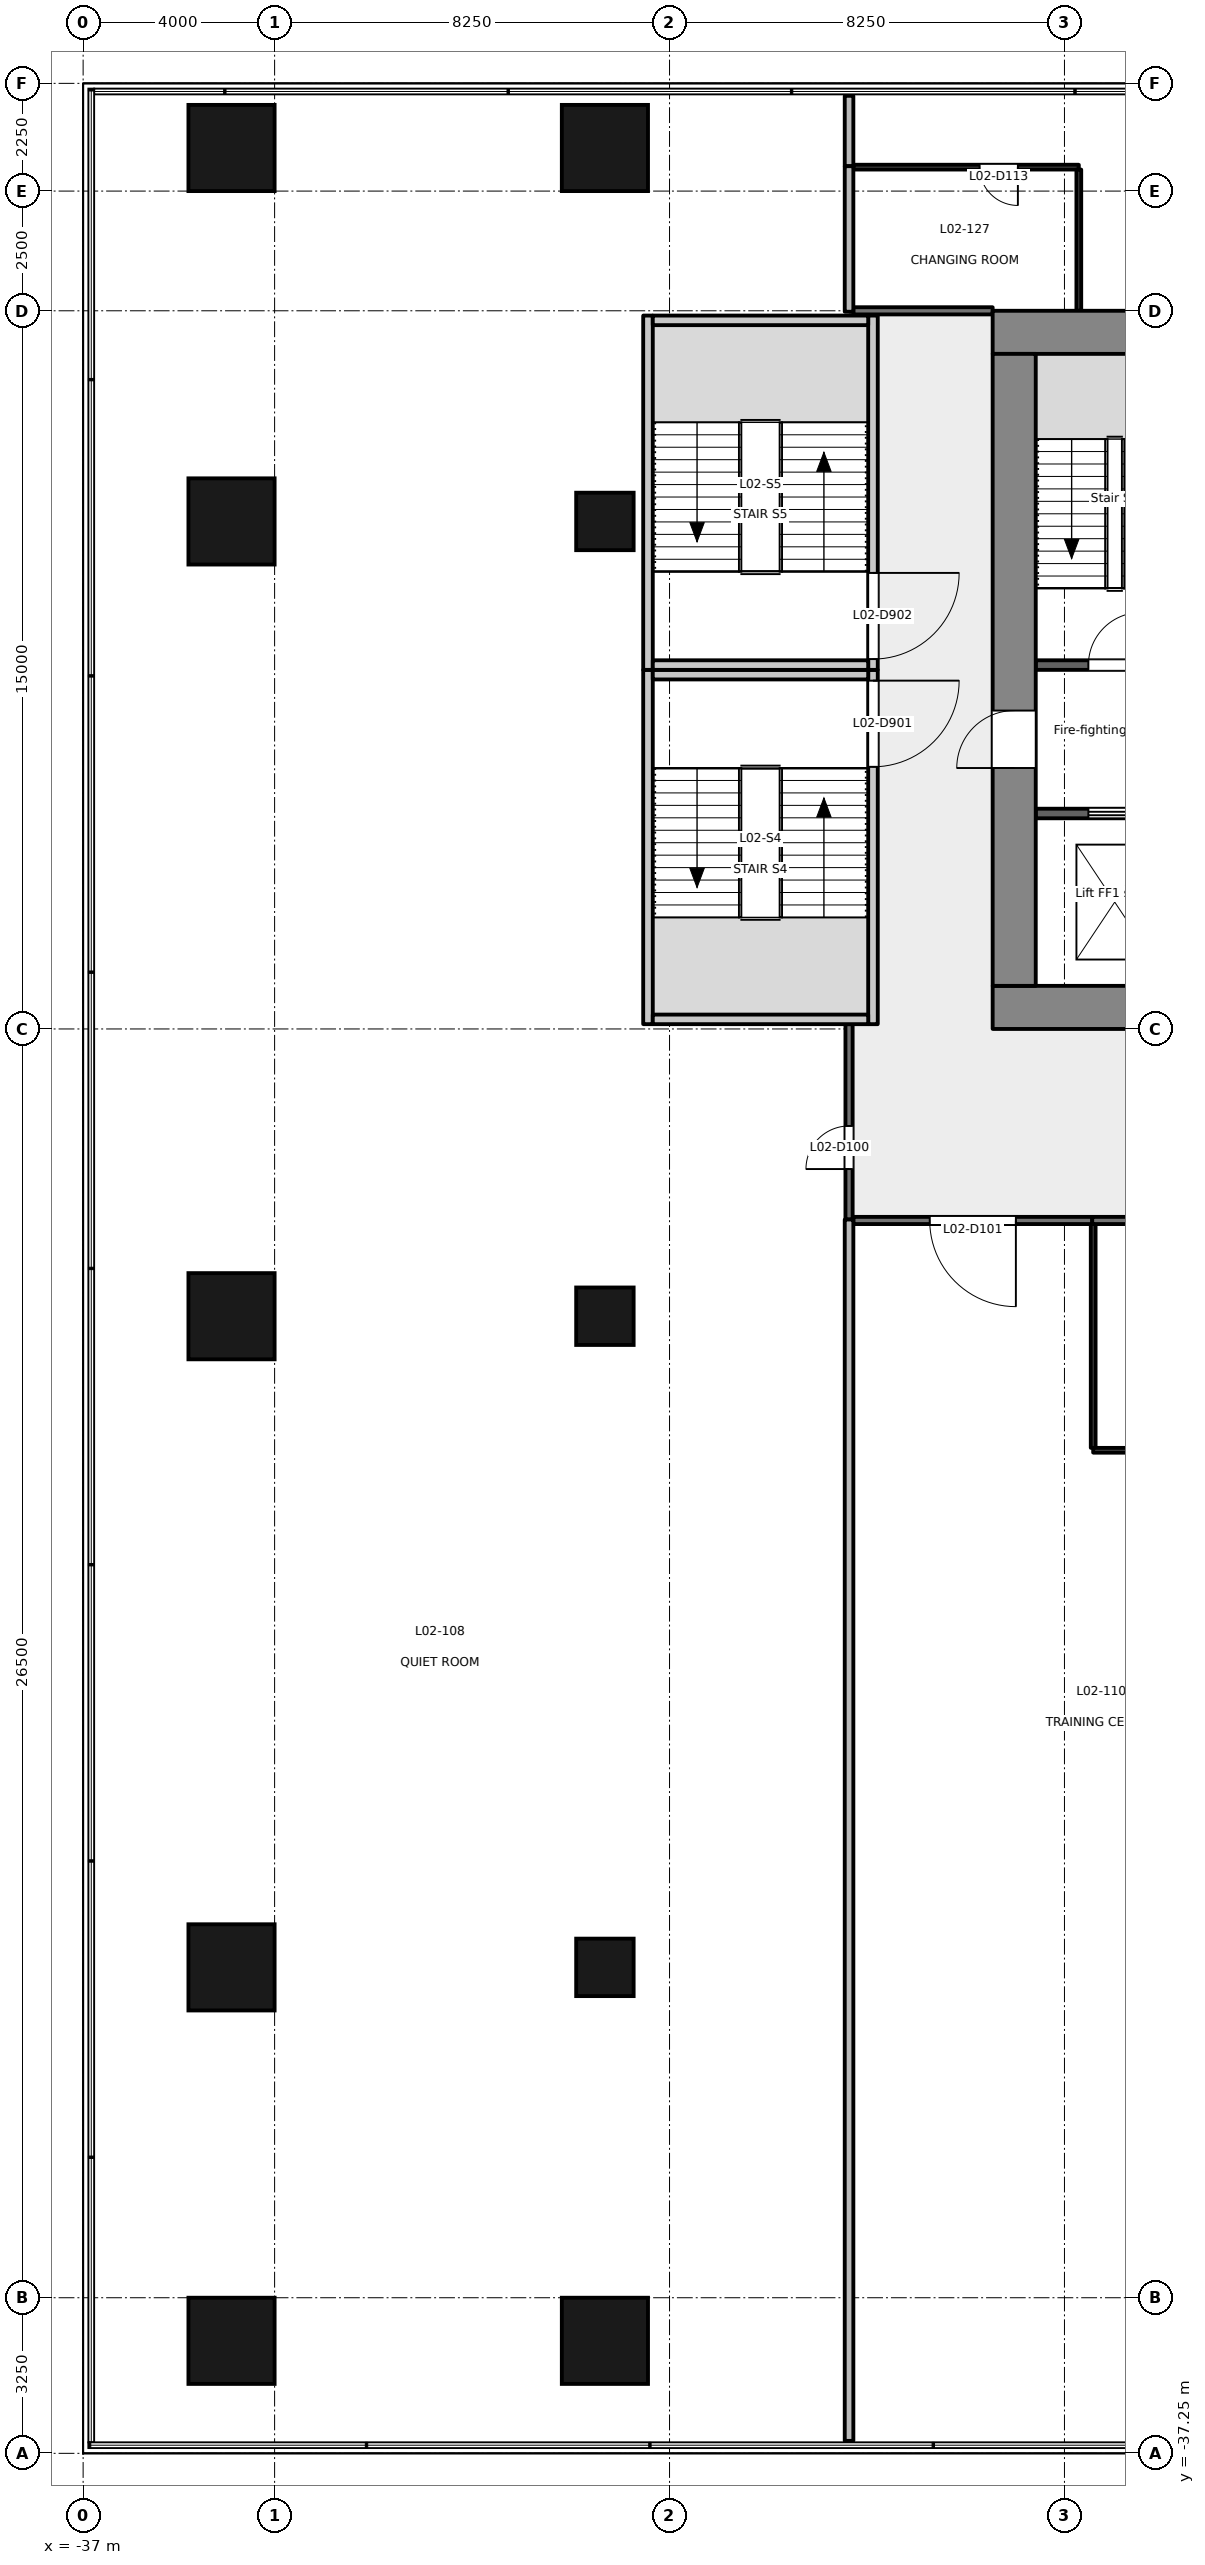
"""IFC4 building model, lengths in metres.
Left out: names, types, materials, properties, quantities, classifications, styles, units other than length and angle.
Written with IfcOpenShell. Run it as: python <this file> out.ifc"""

import sys

from ifc_helpers import new_model, si_unit, direction, frame, frame_2d, origin, origin_2d, place, context, subcontext, project, spatial, rectangle, extrude, element, fill, save


model = new_model("IFC4")
c1 = context("Model", 3, precision=1e-05, world=origin(), true_north=direction((0.0, 1.0)))
c2 = subcontext(c1, "Body", "Model", "MODEL_VIEW")
j1 = project(units=[si_unit("LENGTHUNIT", "METRE"), si_unit("PLANEANGLEUNIT", "RADIAN")], contexts=[c1])
p1 = place(None, origin())
s1 = spatial("IfcSite", under=j1, at=p1, CompositionType="ELEMENT")
p2 = place(p1, origin())
s2 = spatial("IfcBuilding", under=s1, at=p2, CompositionType="ELEMENT")
p3 = place(p2, frame((0.0, 0.0, 12.6)))
s3 = spatial("IfcBuildingStorey", under=s2, at=p3, CompositionType="ELEMENT", Elevation=12.6)
for number, where, z_axis, x_axis in (
    (1, (-33.9, -34.9, -0.2), (0.0, 0.0, 1.0), (1.0, 0.0, 0.0)),
    (2, (-33.9, 10.9, -0.2), (0.0, 0.0, 1.0), (1.0, 0.0, 0.0)),
    (3, (-26.1, -34.9, -0.2), (0.0, 0.0, 1.0), (1.0, 0.0, 0.0)),
    (4, (-33.9, -27.1, -0.2), (0.0, 0.0, 1.0), (0.0, 1.0, 0.0)),
    (5, (-33.9, -13.5, -0.2), (0.0, 0.0, 1.0), (0.0, 1.0, 0.0)),
    (6, (-33.9, 3.1, -0.2), (0.0, 0.0, 1.0), (0.0, 1.0, 0.0)),
    (7, (-26.1, 10.9, -0.2), (0.0, 0.0, 1.0), (1.0, 0.0, 0.0)),
):
    element("IfcColumn", number, at=place(p3, frame(where, z_axis=z_axis, x_axis=x_axis)), inside=s3, PredefinedType="COLUMN", context=c2, shape_type="SweptSolid", body=[
        extrude(rectangle(XDim=1.8, YDim=1.8, at=origin_2d()), origin(), (0.0, 0.0, 1.0), 4.8),
    ])
for number, where, z_axis, x_axis in (
    (8, (-26.1, -27.1, -0.2), (0.0, 0.0, 1.0), (1.0, 0.0, 0.0)),
    (9, (-26.1, -13.5, -0.2), (0.0, 0.0, 1.0), (1.0, 0.0, 0.0)),
    (10, (-26.1, 3.1, -0.2), (0.0, 0.0, 1.0), (1.0, 0.0, 0.0)),
):
    element("IfcColumn", number, at=place(p3, frame(where, z_axis=z_axis, x_axis=x_axis)), inside=s3, PredefinedType="COLUMN", context=c2, shape_type="SweptSolid", body=[
        extrude(rectangle(XDim=1.2, YDim=1.2, at=origin_2d()), origin(), (0.0, 0.0, 1.0), 4.8),
    ])
p4 = place(p3, frame((-18.0, -7.05, -0.2), z_axis=(0.0, 0.0, 1.0), x_axis=(1.0, 0.0, 0.0)))
e11 = element("IfcWall", 11, at=p4, inside=s3, PredefinedType="SHEAR", context=c2, shape_type="SweptSolid", body=[
    extrude(rectangle(XDim=36.0, YDim=0.9, at=frame_2d((18.0, 0.0))), origin(), (0.0, 0.0, 1.0), 4.8),
])
p5 = place(p4, frame((7.8, 0.0, 0.2)))
e12 = element("IfcOpeningElement", 12, at=p5, cuts=e11, PredefinedType="OPENING", context=c2, shape_type="SweptSolid", body=[
    extrude(rectangle(XDim=2.4, YDim=2.1, at=frame_2d((1.2, 1.05))), frame((0.0, 0.46, 0.0), z_axis=(0.0, -1.0, 0.0), x_axis=(1.0, 0.0, 0.0)), (0.0, 0.0, 1.0), 0.921),
])
p6 = place(p4, frame((17.4, 0.0, 0.2)))
e13 = element("IfcOpeningElement", 13, at=p6, cuts=e11, PredefinedType="OPENING", context=c2, shape_type="SweptSolid", body=[
    extrude(rectangle(XDim=1.2, YDim=2.1, at=frame_2d((0.6, 1.05))), frame((0.0, 0.46, 0.0), z_axis=(0.0, -1.0, 0.0), x_axis=(1.0, 0.0, 0.0)), (0.0, 0.0, 1.0), 0.921),
])
p7 = place(p4, frame((26.1, 0.0, 0.2)))
e14 = element("IfcOpeningElement", 14, at=p7, cuts=e11, PredefinedType="OPENING", context=c2, shape_type="SweptSolid", body=[
    extrude(rectangle(XDim=2.4, YDim=2.1, at=frame_2d((1.2, 1.05))), frame((0.0, 0.46, 0.0), z_axis=(0.0, -1.0, 0.0), x_axis=(1.0, 0.0, 0.0)), (0.0, 0.0, 1.0), 0.921),
])
p8 = place(p3, frame((-18.0, 7.05, -0.2), z_axis=(0.0, 0.0, 1.0), x_axis=(1.0, 0.0, 0.0)))
e15 = element("IfcWall", 15, at=p8, inside=s3, PredefinedType="SHEAR", context=c2, shape_type="SweptSolid", body=[
    extrude(rectangle(XDim=36.0, YDim=0.9, at=frame_2d((18.0, 0.0))), origin(), (0.0, 0.0, 1.0), 4.8),
])
p9 = place(p3, frame((-17.55, -6.6, -0.2), z_axis=(0.0, 0.0, 1.0), x_axis=(0.0, 1.0, 0.0)))
e16 = element("IfcWall", 16, at=p9, inside=s3, PredefinedType="SHEAR", context=c2, shape_type="SweptSolid", body=[
    extrude(rectangle(XDim=13.2, YDim=0.9, at=frame_2d((6.6, 0.0))), origin(), (0.0, 0.0, 1.0), 4.8),
])
p10 = place(p9, frame((4.55, 0.0, 0.2)))
e17 = element("IfcOpeningElement", 17, at=p10, cuts=e16, PredefinedType="OPENING", context=c2, shape_type="SweptSolid", body=[
    extrude(rectangle(XDim=1.2, YDim=2.1, at=frame_2d((0.6, 1.05))), frame((0.0, 0.46, 0.0), z_axis=(0.0, -1.0, 0.0), x_axis=(1.0, 0.0, 0.0)), (0.0, 0.0, 1.0), 0.921),
])
p11 = place(p3, frame((-17.1, -3.0, 0.0), z_axis=(0.0, 0.0, 1.0), x_axis=(1.0, 0.0, 0.0)))
e18 = element("IfcWall", 18, at=p11, inside=s3, PredefinedType="PARTITIONING", context=c2, shape_type="SweptSolid", body=[
    extrude(rectangle(XDim=3.3, YDim=0.2, at=frame_2d((1.65, 0.0))), origin(), (0.0, 0.0, 1.0), 4.6),
])
p12 = place(p11, frame((1.1, 0.0, 0.0)))
e19 = element("IfcOpeningElement", 19, at=p12, cuts=e18, PredefinedType="OPENING", context=c2, shape_type="SweptSolid", body=[
    extrude(rectangle(XDim=1.1, YDim=2.1, at=frame_2d((0.55, 1.05))), frame((0.0, 0.111, 0.0), z_axis=(0.0, -1.0, 0.0), x_axis=(1.0, 0.0, 0.0)), (0.0, 0.0, 1.0), 0.221),
])
p13 = place(p3, frame((-17.1, 0.1, 0.0), z_axis=(0.0, 0.0, 1.0), x_axis=(1.0, 0.0, 0.0)))
e20 = element("IfcWall", 20, at=p13, inside=s3, PredefinedType="PARTITIONING", context=c2, shape_type="SweptSolid", body=[
    extrude(rectangle(XDim=3.3, YDim=0.2, at=frame_2d((1.65, 0.0))), origin(), (0.0, 0.0, 1.0), 4.6),
])
p14 = place(p13, frame((1.1, 0.0, 0.0)))
e21 = element("IfcOpeningElement", 21, at=p14, cuts=e20, PredefinedType="OPENING", context=c2, shape_type="SweptSolid", body=[
    extrude(rectangle(XDim=1.1, YDim=2.1, at=frame_2d((0.55, 1.05))), frame((0.0, 0.111, 0.0), z_axis=(0.0, -1.0, 0.0), x_axis=(1.0, 0.0, 0.0)), (0.0, 0.0, 1.0), 0.221),
])
p15 = place(p3, frame((-20.5, 0.0, -0.2), z_axis=(0.0, 0.0, 1.0), x_axis=(0.0, -1.0, 0.0)))
e22 = element("IfcWall", 22, at=p15, inside=s3, PredefinedType="SHEAR", context=c2, shape_type="SweptSolid", body=[
    extrude(rectangle(XDim=7.4, YDim=0.2, at=frame_2d((3.7, 0.0))), origin(), (0.0, 0.0, 1.0), 4.8),
])
p16 = place(p15, frame((0.225, 0.0, 0.2)))
e23 = element("IfcOpeningElement", 23, at=p16, cuts=e22, PredefinedType="OPENING", context=c2, shape_type="SweptSolid", body=[
    extrude(rectangle(XDim=1.8, YDim=2.1, at=frame_2d((0.9, 1.05))), frame((0.0, 0.111, 0.0), z_axis=(0.0, -1.0, 0.0), x_axis=(1.0, 0.0, 0.0)), (0.0, 0.0, 1.0), 0.221),
])
p17 = place(p3, frame((-25.2, -7.4, -0.2), z_axis=(0.0, 0.0, 1.0), x_axis=(0.0, 1.0, 0.0)))
e24 = element("IfcWall", 24, at=p17, inside=s3, PredefinedType="SHEAR", context=c2, shape_type="SweptSolid", body=[
    extrude(rectangle(XDim=7.4, YDim=0.2, at=frame_2d((3.7, 0.0))), origin(), (0.0, 0.0, 1.0), 4.8),
])
for number, where, z_axis, x_axis in (
    (25, (-25.1, -0.1, -0.2), (0.0, 0.0, 1.0), (1.0, 0.0, 0.0)),
    (26, (-25.1, -7.3, -0.2), (0.0, 0.0, 1.0), (1.0, 0.0, 0.0)),
):
    element("IfcWall", number, at=place(p3, frame(where, z_axis=z_axis, x_axis=x_axis)), inside=s3, PredefinedType="SHEAR", context=c2, shape_type="SweptSolid", body=[
        extrude(rectangle(XDim=4.5, YDim=0.2, at=frame_2d((2.25, 0.0))), origin(), (0.0, 0.0, 1.0), 4.8),
    ])
p18 = place(p3, frame((-20.5, 7.4, -0.2), z_axis=(0.0, 0.0, 1.0), x_axis=(0.0, -1.0, 0.0)))
e27 = element("IfcWall", 27, at=p18, inside=s3, PredefinedType="SHEAR", context=c2, shape_type="SweptSolid", body=[
    extrude(rectangle(XDim=7.4, YDim=0.2, at=frame_2d((3.7, 0.0))), origin(), (0.0, 0.0, 1.0), 4.8),
])
p19 = place(p18, frame((5.375, 0.0, 0.2)))
e28 = element("IfcOpeningElement", 28, at=p19, cuts=e27, PredefinedType="OPENING", context=c2, shape_type="SweptSolid", body=[
    extrude(rectangle(XDim=1.8, YDim=2.1, at=frame_2d((0.9, 1.05))), frame((0.0, 0.111, 0.0), z_axis=(0.0, -1.0, 0.0), x_axis=(1.0, 0.0, 0.0)), (0.0, 0.0, 1.0), 0.221),
])
p20 = place(p3, frame((-25.2, 0.0, -0.2), z_axis=(0.0, 0.0, 1.0), x_axis=(0.0, 1.0, 0.0)))
e29 = element("IfcWall", 29, at=p20, inside=s3, PredefinedType="SHEAR", context=c2, shape_type="SweptSolid", body=[
    extrude(rectangle(XDim=7.4, YDim=0.2, at=frame_2d((3.7, 0.0))), origin(), (0.0, 0.0, 1.0), 4.8),
])
for number, where, z_axis, x_axis in (
    (30, (-25.1, 7.3, -0.2), (0.0, 0.0, 1.0), (1.0, 0.0, 0.0)),
    (31, (-25.1, 0.1, -0.2), (0.0, 0.0, 1.0), (1.0, 0.0, 0.0)),
):
    element("IfcWall", number, at=place(p3, frame(where, z_axis=z_axis, x_axis=x_axis)), inside=s3, PredefinedType="SHEAR", context=c2, shape_type="SweptSolid", body=[
        extrude(rectangle(XDim=4.5, YDim=0.2, at=frame_2d((2.25, 0.0))), origin(), (0.0, 0.0, 1.0), 4.8),
    ])
p21 = place(p3, frame((-21.0, -11.48, 0.0), z_axis=(0.0, 0.0, 1.0), x_axis=(0.0, 1.0, 0.0)))
e32 = element("IfcWall", 32, at=p21, inside=s3, PredefinedType="PARTITIONING", context=c2, shape_type="SweptSolid", body=[
    extrude(rectangle(XDim=4.08, YDim=0.15, at=frame_2d((2.04, 0.0))), origin(), (0.0, 0.0, 1.0), 4.6),
])
p22 = place(p21, frame((1.054, 0.0, 0.0)))
e33 = element("IfcOpeningElement", 33, at=p22, cuts=e32, PredefinedType="OPENING", context=c2, shape_type="SweptSolid", body=[
    extrude(rectangle(XDim=0.9, YDim=2.1, at=frame_2d((0.45, 1.05))), frame((0.0, 0.085, 0.0), z_axis=(0.0, -1.0, 0.0), x_axis=(1.0, 0.0, 0.0)), (0.0, 0.0, 1.0), 0.171),
])
p23 = place(p3, frame((-15.92, -11.5, 0.0), z_axis=(0.0, 0.0, 1.0), x_axis=(-1.0, 0.0, 0.0)))
e34 = element("IfcWall", 34, at=p23, inside=s3, PredefinedType="PARTITIONING", context=c2, shape_type="SweptSolid", body=[
    extrude(rectangle(XDim=4.99, YDim=0.15, at=frame_2d((2.495, 0.0))), origin(), (0.0, 0.0, 1.0), 4.3),
])
p24 = place(p23, frame((1.595, 0.0, 0.0)))
e35 = element("IfcOpeningElement", 35, at=p24, cuts=e34, PredefinedType="OPENING", context=c2, shape_type="SweptSolid", body=[
    extrude(rectangle(XDim=1.8, YDim=2.1, at=frame_2d((0.9, 1.05))), frame((0.0, 0.085, 0.0), z_axis=(0.0, -1.0, 0.0), x_axis=(1.0, 0.0, 0.0)), (0.0, 0.0, 1.0), 0.171),
])
p25 = place(p3, frame((-10.45, -11.5, 0.0), z_axis=(0.0, 0.0, 1.0), x_axis=(-1.0, 0.0, 0.0)))
e36 = element("IfcWall", 36, at=p25, inside=s3, PredefinedType="PARTITIONING", context=c2, shape_type="SweptSolid", body=[
    extrude(rectangle(XDim=5.47, YDim=0.15, at=frame_2d((2.735, 0.0))), origin(), (0.0, 0.0, 1.0), 3.2),
])
p26 = place(p3, frame((-20.91, 7.499, 0.0), z_axis=(0.0, 0.0, 1.0), x_axis=(1.0, 0.0, 0.0)))
e37 = element("IfcWall", 37, at=p26, inside=s3, PredefinedType="PARTITIONING", context=c2, shape_type="SweptSolid", body=[
    extrude(rectangle(XDim=2.91, YDim=0.15, at=frame_2d((1.455, 0.0))), origin(), (0.0, 0.0, 1.0), 4.3),
])
p27 = place(p3, frame((-21.0, -11.48, 0.0), z_axis=(0.0, 0.0, 1.0), x_axis=(0.0, -1.0, 0.0)))
e38 = element("IfcWall", 38, at=p27, inside=s3, PredefinedType="PARTITIONING", context=c2, shape_type="SweptSolid", body=[
    extrude(rectangle(XDim=25.51, YDim=0.18, at=frame_2d((12.755, 0.0))), origin(), (0.0, 0.0, 1.0), 3.6),
])
p28 = place(p3, frame((-21.0, 11.99, 0.0), z_axis=(0.0, 0.0, 1.0), x_axis=(0.0, -1.0, 0.0)))
e39 = element("IfcWall", 39, at=p28, inside=s3, PredefinedType="PARTITIONING", context=c2, shape_type="SweptSolid", body=[
    extrude(rectangle(XDim=1.47, YDim=0.18, at=frame_2d((0.735, 0.0))), origin(), (0.0, 0.0, 1.0), 3.6),
])
p29 = place(p3, frame((-21.0, 10.52, 0.0), z_axis=(0.0, 0.0, 1.0), x_axis=(0.0, -1.0, 0.0)))
e40 = element("IfcWall", 40, at=p29, inside=s3, PredefinedType="PARTITIONING", context=c2, shape_type="SweptSolid", body=[
    extrude(rectangle(XDim=3.04, YDim=0.18, at=frame_2d((1.52, 0.0))), origin(), (0.0, 0.0, 1.0), 4.6),
])
p30 = place(p3, frame((-15.9, -11.575, 0.0), z_axis=(0.0, 0.0, 1.0), x_axis=(0.0, -1.0, 0.0)))
e41 = element("IfcWall", 41, at=p30, inside=s3, PredefinedType="PARTITIONING", context=c2, shape_type="SweptSolid", body=[
    extrude(rectangle(XDim=4.675, YDim=0.1, at=frame_2d((2.337, 0.0))), origin(), (0.0, 0.0, 1.0), 3.6),
])
p31 = place(p3, frame((-15.9, -16.3, 0.0), z_axis=(0.0, 0.0, 1.0), x_axis=(1.0, 0.0, 0.0)))
e42 = element("IfcWall", 42, at=p31, inside=s3, PredefinedType="PARTITIONING", context=c2, shape_type="SweptSolid", body=[
    extrude(rectangle(XDim=5.45, YDim=0.1, at=frame_2d((2.725, 0.0))), origin(), (0.0, 0.0, 1.0), 3.6),
])
p32 = place(p31, frame((1.495, 0.0, 0.0)))
e43 = element("IfcOpeningElement", 43, at=p32, cuts=e42, PredefinedType="OPENING", context=c2, shape_type="SweptSolid", body=[
    extrude(rectangle(XDim=0.8, YDim=2.1, at=frame_2d((0.4, 1.05))), frame((0.0, 0.061, 0.0), z_axis=(0.0, -1.0, 0.0), x_axis=(1.0, 0.0, 0.0)), (0.0, 0.0, 1.0), 0.121),
])
p33 = place(p3, frame((-16.2, 10.5, 0.0), z_axis=(0.0, 0.0, 1.0), x_axis=(-1.0, 0.0, 0.0)))
e44 = element("IfcWall", 44, at=p33, inside=s3, PredefinedType="PARTITIONING", context=c2, shape_type="SweptSolid", body=[
    extrude(rectangle(XDim=4.71, YDim=0.1, at=frame_2d((2.355, 0.0))), origin(), (0.0, 0.0, 1.0), 4.3),
])
p34 = place(p33, frame((1.273, 0.0, 0.0)))
e45 = element("IfcOpeningElement", 45, at=p34, cuts=e44, PredefinedType="OPENING", context=c2, shape_type="SweptSolid", body=[
    extrude(rectangle(XDim=0.8, YDim=2.1, at=frame_2d((0.4, 1.05))), frame((0.0, 0.061, 0.0), z_axis=(0.0, -1.0, 0.0), x_axis=(1.0, 0.0, 0.0)), (0.0, 0.0, 1.0), 0.121),
])
p35 = place(p3, frame((-16.2, 7.5, 0.0), z_axis=(0.0, 0.0, 1.0), x_axis=(0.0, 1.0, 0.0)))
e46 = element("IfcWall", 46, at=p35, inside=s3, PredefinedType="PARTITIONING", context=c2, shape_type="SweptSolid", body=[
    extrude(rectangle(XDim=2.95, YDim=0.1, at=frame_2d((1.475, 0.0))), origin(), (0.0, 0.0, 1.0), 4.6),
])
p36 = place(p12, origin())
e47 = element("IfcDoor", 47, at=p36, inside=s3, OperationType="DOUBLE_DOOR_SLIDING", PredefinedType="DOOR", context=c2, shape_type="SweptSolid", body=[
    extrude(rectangle(XDim=1.1, YDim=2.1, at=frame_2d((0.55, 1.05))), frame((0.0, 0.025, 0.0), z_axis=(0.0, -1.0, 0.0), x_axis=(1.0, 0.0, 0.0)), (0.0, 0.0, 1.0), 0.05),
])
fill(e19, e47)
p37 = place(p10, origin())
e48 = element("IfcDoor", 48, at=p37, inside=s3, OperationType="SINGLE_SWING_LEFT", PredefinedType="DOOR", context=c2, shape_type="SweptSolid", body=[
    extrude(rectangle(XDim=1.2, YDim=2.1, at=frame_2d((0.6, 1.05))), frame((0.0, 0.025, 0.0), z_axis=(0.0, -1.0, 0.0), x_axis=(1.0, 0.0, 0.0)), (0.0, 0.0, 1.0), 0.05),
])
fill(e17, e48)
p38 = place(p14, origin())
e49 = element("IfcDoor", 49, at=p38, inside=s3, OperationType="SINGLE_SWING_RIGHT", PredefinedType="DOOR", context=c2, shape_type="SweptSolid", body=[
    extrude(rectangle(XDim=1.1, YDim=2.1, at=frame_2d((0.55, 1.05))), frame((0.0, 0.025, 0.0), z_axis=(0.0, -1.0, 0.0), x_axis=(1.0, 0.0, 0.0)), (0.0, 0.0, 1.0), 0.05),
])
fill(e21, e49)
p39 = place(p16, origin())
e50 = element("IfcDoor", 50, at=p39, inside=s3, OperationType="DOUBLE_DOOR_SINGLE_SWING", PredefinedType="DOOR", context=c2, shape_type="SweptSolid", body=[
    extrude(rectangle(XDim=1.8, YDim=2.1, at=frame_2d((0.9, 1.05))), frame((0.0, 0.025, 0.0), z_axis=(0.0, -1.0, 0.0), x_axis=(1.0, 0.0, 0.0)), (0.0, 0.0, 1.0), 0.05),
])
fill(e23, e50)
p40 = place(p19, origin())
e51 = element("IfcDoor", 51, at=p40, inside=s3, OperationType="DOUBLE_DOOR_SINGLE_SWING", PredefinedType="DOOR", context=c2, shape_type="SweptSolid", body=[
    extrude(rectangle(XDim=1.8, YDim=2.1, at=frame_2d((0.9, 1.05))), frame((0.0, 0.025, 0.0), z_axis=(0.0, -1.0, 0.0), x_axis=(1.0, 0.0, 0.0)), (0.0, 0.0, 1.0), 0.05),
])
fill(e28, e51)
p41 = place(p22, origin())
e52 = element("IfcDoor", 52, at=p41, inside=s3, OperationType="SINGLE_SWING_LEFT", PredefinedType="DOOR", context=c2, shape_type="SweptSolid", body=[
    extrude(rectangle(XDim=0.9, YDim=2.1, at=frame_2d((0.45, 1.05))), frame((0.0, 0.025, 0.0), z_axis=(0.0, -1.0, 0.0), x_axis=(1.0, 0.0, 0.0)), (0.0, 0.0, 1.0), 0.05),
])
fill(e33, e52)
p42 = place(p24, origin())
e53 = element("IfcDoor", 53, at=p42, inside=s3, OperationType="DOUBLE_DOOR_SINGLE_SWING", PredefinedType="DOOR", context=c2, shape_type="SweptSolid", body=[
    extrude(rectangle(XDim=1.8, YDim=2.1, at=frame_2d((0.9, 1.05))), frame((0.0, 0.025, 0.0), z_axis=(0.0, -1.0, 0.0), x_axis=(1.0, 0.0, 0.0)), (0.0, 0.0, 1.0), 0.05),
])
fill(e35, e53)
p43 = place(p34, origin())
e54 = element("IfcDoor", 54, at=p43, inside=s3, OperationType="SINGLE_SWING_LEFT", PredefinedType="DOOR", context=c2, shape_type="SweptSolid", body=[
    extrude(rectangle(XDim=0.8, YDim=2.1, at=frame_2d((0.4, 1.05))), frame((0.0, 0.025, 0.0), z_axis=(0.0, -1.0, 0.0), x_axis=(1.0, 0.0, 0.0)), (0.0, 0.0, 1.0), 0.05),
])
fill(e45, e54)
save(model, sys.argv[1])
